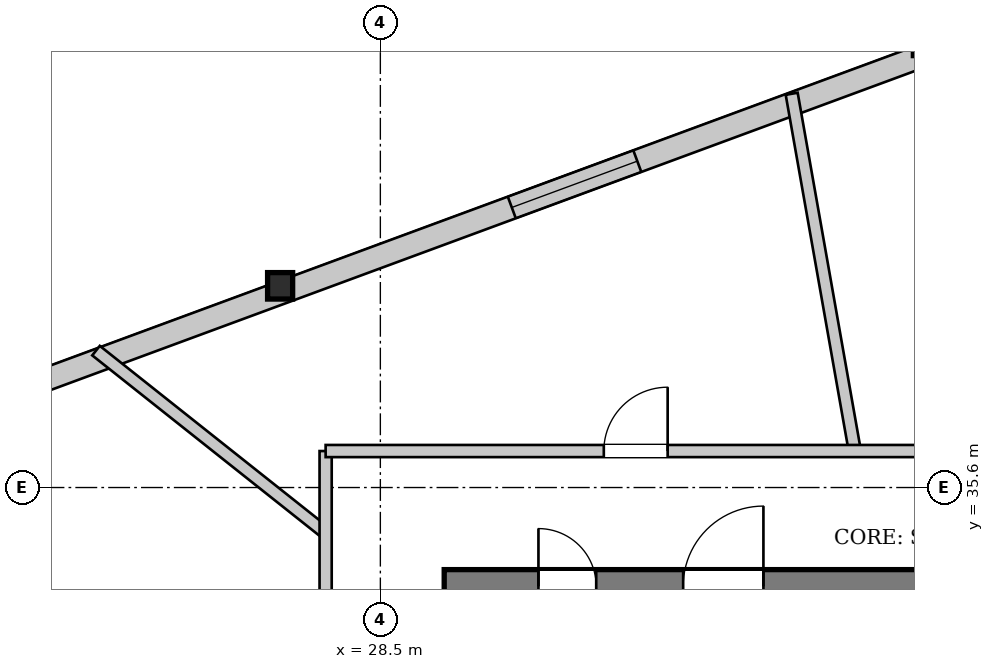
"""IFC4 building model, lengths in metres.
Left out: names, types, materials, properties, quantities, classifications, styles, units other than length and angle.
Written with IfcOpenShell. Run it as: python <this file> out.ifc"""

import sys

from ifc_helpers import new_model, si_unit, direction, frame, frame_2d, origin, origin_2d, place, context, subcontext, project, spatial, rectangle, i_section, extrude, source, transform, mapped, element, fill, save


model = new_model("IFC4")
c1 = context("Model", 3, precision=1e-05, world=origin(), true_north=direction((0.0, 1.0)))
c2 = subcontext(c1, "Body", "Model", "MODEL_VIEW")
j1 = project(units=[si_unit("LENGTHUNIT", "METRE"), si_unit("PLANEANGLEUNIT", "RADIAN")], contexts=[c1])
p1 = place(None, origin())
s1 = spatial("IfcSite", under=j1, at=p1, CompositionType="ELEMENT")
p2 = place(p1, origin())
s2 = spatial("IfcBuilding", under=s1, at=p2, CompositionType="ELEMENT")
p3 = place(p2, frame((0.0, 0.0, 185.65)))
s3 = spatial("IfcBuildingStorey", under=s2, at=p3, CompositionType="ELEMENT", Elevation=185.65)
m1 = source(origin(), c2, "Body", "SweptSolid", [
    extrude(i_section(OverallWidth=0.412, OverallDepth=0.435, WebThickness=0.031, FlangeThickness=0.05, at=origin_2d()), origin(), (0.0, 0.0, 1.0), 3.395),
])
p4 = place(p3, frame((37.594, 42.967, 0.0), z_axis=(-0.072052690953, -0.027684916185, 0.997016527016), x_axis=(0.35866692441, -0.933465605866, 0.0)))
e1 = element("IfcColumn", 1, at=p4, inside=s3, PredefinedType="COLUMN", context=c2, shape_type="MappedRepresentation", body=[
    mapped(m1, transform((0.0, 0.0, 0.0), x_axis=(1.0, 0.0, 0.0), y_axis=(0.0, 1.0, 0.0), z_axis=(0.0, 0.0, 1.0), scale=1.0)),
])
m2 = source(origin(), c2, "Body", "SweptSolid", [
    extrude(i_section(OverallWidth=0.412, OverallDepth=0.435, WebThickness=0.031, FlangeThickness=0.05, at=origin_2d()), origin(), (0.0, 0.0, 1.0), 3.398),
])
p5 = place(p3, frame((26.94, 39.034, 0.0), z_axis=(-0.051951924281, -0.068694383973, 0.996284135763), x_axis=(0.797590801114, -0.603198900843, 0.0)))
e2 = element("IfcColumn", 2, at=p5, inside=s3, PredefinedType="COLUMN", context=c2, shape_type="MappedRepresentation", body=[
    mapped(m2, transform((0.0, 0.0, 0.0), x_axis=(1.0, 0.0, 0.0), y_axis=(0.0, 1.0, 0.0), z_axis=(0.0, 0.0, 1.0), scale=1.0)),
])
p6 = place(p3, frame((16.351, 34.922, 0.0), z_axis=(0.0, 0.0, 1.0), x_axis=(0.938118125274, 0.346315438629, 0.0)))
e3 = element("IfcWall", 3, at=p6, inside=s3, PredefinedType="SOLIDWALL", context=c2, shape_type="SweptSolid", body=[
    extrude(rectangle(XDim=22.715, YDim=0.38, at=frame_2d((11.357, 0.0))), origin(), (0.0, 0.0, 1.0), 2.722),
])
p7 = place(p6, frame((4.81, 0.0, 0.352)))
e4 = element("IfcOpeningElement", 4, at=p7, cuts=e3, PredefinedType="OPENING", context=c2, shape_type="SweptSolid", body=[
    extrude(rectangle(XDim=2.2, YDim=2.25, at=frame_2d((1.1, 1.125))), frame((0.0, 0.2, 0.0), z_axis=(0.0, -1.0, 0.0), x_axis=(1.0, 0.0, 0.0)), (0.0, 0.0, 1.0), 0.4),
])
p8 = place(p6, frame((15.255, 0.0, 0.352)))
e5 = element("IfcOpeningElement", 5, at=p8, cuts=e3, PredefinedType="OPENING", context=c2, shape_type="SweptSolid", body=[
    extrude(rectangle(XDim=2.2, YDim=2.25, at=frame_2d((1.1, 1.125))), frame((0.0, 0.2, 0.0), z_axis=(0.0, -1.0, 0.0), x_axis=(1.0, 0.0, 0.0)), (0.0, 0.0, 1.0), 0.4),
])
p9 = place(p3, frame((29.55, 33.975, 0.0), z_axis=(0.0, 0.0, 1.0), x_axis=(1.0, 0.0, 0.0)))
e6 = element("IfcWall", 6, at=p9, inside=s3, PredefinedType="SHEAR", context=c2, shape_type="SweptSolid", body=[
    extrude(rectangle(XDim=16.9, YDim=0.55, at=frame_2d((8.45, 0.0))), origin(), (0.0, 0.0, 1.0), 3.33),
])
p10 = place(p9, frame((1.55, 0.0, 0.0)))
e7 = element("IfcOpeningElement", 7, at=p10, cuts=e6, PredefinedType="OPENING", context=c2, shape_type="SweptSolid", body=[
    extrude(rectangle(XDim=0.95, YDim=2.1, at=frame_2d((0.475, 1.05))), frame((0.0, 0.285, 0.0), z_axis=(0.0, -1.0, 0.0), x_axis=(1.0, 0.0, 0.0)), (0.0, 0.0, 1.0), 0.57),
])
p11 = place(p9, frame((3.93, 0.0, 0.0)))
e8 = element("IfcOpeningElement", 8, at=p11, cuts=e6, PredefinedType="OPENING", context=c2, shape_type="SweptSolid", body=[
    extrude(rectangle(XDim=1.32, YDim=2.2, at=frame_2d((0.66, 1.1))), frame((0.0, 0.285, 0.0), z_axis=(0.0, -1.0, 0.0), x_axis=(1.0, 0.0, 0.0)), (0.0, 0.0, 1.0), 0.57),
])
p12 = place(p3, frame((36.303, 36.2, 0.0), z_axis=(0.0, 0.0, 1.0), x_axis=(-0.174032770855, 0.98473986142, 0.0)))
e9 = element("IfcWall", 9, at=p12, inside=s3, PredefinedType="PARTITIONING", context=c2, shape_type="SweptSolid", body=[
    extrude(rectangle(XDim=5.966, YDim=0.2, at=frame_2d((2.983, 0.0))), origin(), (0.0, 0.0, 1.0), 3.33),
])
p13 = place(p3, frame((27.6, 34.854, 0.0), z_axis=(0.0, 0.0, 1.0), x_axis=(-0.783268941763, 0.621683009957, 0.0)))
e10 = element("IfcWall", 10, at=p13, inside=s3, PredefinedType="PARTITIONING", context=c2, shape_type="SweptSolid", body=[
    extrude(rectangle(XDim=4.821, YDim=0.2, at=frame_2d((2.411, 0.0))), origin(), (0.0, 0.0, 1.0), 3.33),
])
p14 = place(p3, frame((27.6, 17.0, 0.0), z_axis=(0.0, 0.0, 1.0), x_axis=(0.0, 1.0, 0.0)))
e11 = element("IfcWall", 11, at=p14, inside=s3, PredefinedType="PARTITIONING", context=c2, shape_type="SweptSolid", body=[
    extrude(rectangle(XDim=19.2, YDim=0.2, at=frame_2d((9.6, 0.0))), origin(), (0.0, 0.0, 1.0), 3.33),
])
p15 = place(p14, frame((15.392, 0.0, 0.0)))
e12 = element("IfcOpeningElement", 12, at=p15, cuts=e11, PredefinedType="OPENING", context=c2, shape_type="SweptSolid", body=[
    extrude(rectangle(XDim=1.05, YDim=2.2, at=frame_2d((0.525, 1.1))), frame((0.0, 0.11, 0.0), z_axis=(0.0, -1.0, 0.0), x_axis=(1.0, 0.0, 0.0)), (0.0, 0.0, 1.0), 0.22),
])
p16 = place(p14, frame((3.938, 0.0, 0.0)))
e13 = element("IfcOpeningElement", 13, at=p16, cuts=e11, PredefinedType="OPENING", context=c2, shape_type="SweptSolid", body=[
    extrude(rectangle(XDim=1.05, YDim=2.2, at=frame_2d((0.525, 1.1))), frame((0.0, 0.11, 0.0), z_axis=(0.0, -1.0, 0.0), x_axis=(1.0, 0.0, 0.0)), (0.0, 0.0, 1.0), 0.22),
])
p17 = place(p3, frame((27.6, 36.2, 0.0), z_axis=(0.0, 0.0, 1.0), x_axis=(1.0, 0.0, 0.0)))
e14 = element("IfcWall", 14, at=p17, inside=s3, PredefinedType="PARTITIONING", context=c2, shape_type="SweptSolid", body=[
    extrude(rectangle(XDim=13.4, YDim=0.2, at=frame_2d((6.7, 0.0))), origin(), (0.0, 0.0, 1.0), 3.33),
])
p18 = place(p17, frame((12.05, 0.0, 0.0)))
e15 = element("IfcOpeningElement", 15, at=p18, cuts=e14, PredefinedType="OPENING", context=c2, shape_type="SweptSolid", body=[
    extrude(rectangle(XDim=1.05, YDim=2.2, at=frame_2d((0.525, 1.1))), frame((0.0, 0.11, 0.0), z_axis=(0.0, -1.0, 0.0), x_axis=(1.0, 0.0, 0.0)), (0.0, 0.0, 1.0), 0.22),
])
p19 = place(p17, frame((4.575, 0.0, 0.0)))
e16 = element("IfcOpeningElement", 16, at=p19, cuts=e14, PredefinedType="OPENING", context=c2, shape_type="SweptSolid", body=[
    extrude(rectangle(XDim=1.05, YDim=2.2, at=frame_2d((0.525, 1.1))), frame((0.0, 0.11, 0.0), z_axis=(0.0, -1.0, 0.0), x_axis=(1.0, 0.0, 0.0)), (0.0, 0.0, 1.0), 0.22),
])
m3 = source(origin(), c2, "Body", "SweptSolid", [
    extrude(rectangle(XDim=2.2, YDim=2.25, at=frame_2d((1.1, 1.125))), frame((0.0, 0.03, 0.0), z_axis=(0.0, -1.0, 0.0), x_axis=(1.0, 0.0, 0.0)), (0.0, 0.0, 1.0), 0.06),
])
p20 = place(p8, origin())
e17 = element("IfcWindow", 17, at=p20, inside=s3, PartitioningType="SINGLE_PANEL", PredefinedType="WINDOW", context=c2, shape_type="MappedRepresentation", body=[
    mapped(m3, transform((0.0, 0.0, 0.0), x_axis=(1.0, 0.0, 0.0), y_axis=(0.0, 1.0, 0.0), z_axis=(0.0, 0.0, 1.0), scale=1.0)),
])
fill(e5, e17)
m4 = source(origin(), c2, "Body", "SweptSolid", [
    extrude(rectangle(XDim=0.95, YDim=2.1, at=frame_2d((0.475, 1.05))), frame((0.0, 0.025, 0.0), z_axis=(0.0, -1.0, 0.0), x_axis=(1.0, 0.0, 0.0)), (0.0, 0.0, 1.0), 0.05),
])
p21 = place(p10, origin())
e18 = element("IfcDoor", 18, at=p21, inside=s3, OperationType="SINGLE_SWING_LEFT", PredefinedType="DOOR", context=c2, shape_type="MappedRepresentation", body=[
    mapped(m4, transform((0.0, 0.0, 0.0), x_axis=(1.0, 0.0, 0.0), y_axis=(0.0, 1.0, 0.0), z_axis=(0.0, 0.0, 1.0), scale=1.0)),
])
fill(e7, e18)
m5 = source(origin(), c2, "Body", "SweptSolid", [
    extrude(rectangle(XDim=1.32, YDim=2.2, at=frame_2d((0.66, 1.1))), frame((0.0, 0.025, 0.0), z_axis=(0.0, -1.0, 0.0), x_axis=(1.0, 0.0, 0.0)), (0.0, 0.0, 1.0), 0.05),
])
p22 = place(p11, origin())
e19 = element("IfcDoor", 19, at=p22, inside=s3, OperationType="SINGLE_SWING_RIGHT", PredefinedType="DOOR", context=c2, shape_type="MappedRepresentation", body=[
    mapped(m5, transform((0.0, 0.0, 0.0), x_axis=(1.0, 0.0, 0.0), y_axis=(0.0, 1.0, 0.0), z_axis=(0.0, 0.0, 1.0), scale=1.0)),
])
fill(e8, e19)
m6 = source(origin(), c2, "Body", "SweptSolid", [
    extrude(rectangle(XDim=1.05, YDim=2.2, at=frame_2d((0.525, 1.1))), frame((0.0, 0.025, 0.0), z_axis=(0.0, -1.0, 0.0), x_axis=(1.0, 0.0, 0.0)), (0.0, 0.0, 1.0), 0.05),
])
p23 = place(p19, origin())
e20 = element("IfcDoor", 20, at=p23, inside=s3, OperationType="SINGLE_SWING_RIGHT", PredefinedType="DOOR", context=c2, shape_type="MappedRepresentation", body=[
    mapped(m6, transform((0.0, 0.0, 0.0), x_axis=(1.0, 0.0, 0.0), y_axis=(0.0, 1.0, 0.0), z_axis=(0.0, 0.0, 1.0), scale=1.0)),
])
fill(e16, e20)
save(model, sys.argv[1])
